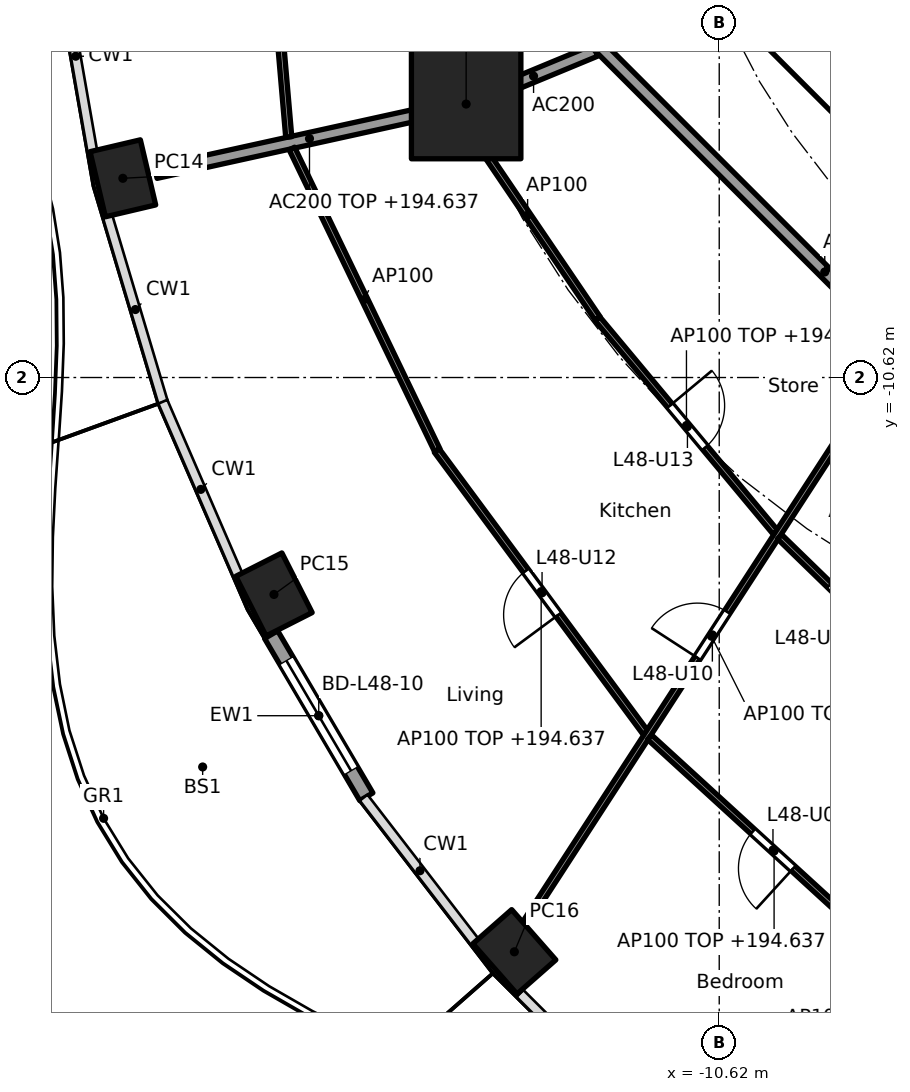
"""IFC4 building model, lengths in metres.
Left out: names, types, materials, properties, quantities, classifications, styles, units other than length and angle.
Written with IfcOpenShell. Run it as: python <this file> out.ifc"""

import sys

from ifc_helpers import new_model, si_unit, direction, frame, frame_2d, origin, origin_2d, place, context, subcontext, project, spatial, rectangle, hollow_rectangle, extrude, element, fill, save


model = new_model("IFC4")
c1 = context("Model", 3, precision=1e-05, world=origin(), true_north=direction((0.0, 1.0)))
c2 = subcontext(c1, "Body", "Model", "MODEL_VIEW")
j1 = project(units=[si_unit("LENGTHUNIT", "METRE"), si_unit("PLANEANGLEUNIT", "RADIAN")], contexts=[c1])
p1 = place(None, origin())
s1 = spatial("IfcSite", under=j1, at=p1, CompositionType="ELEMENT")
p2 = place(p1, origin())
s2 = spatial("IfcBuilding", under=s1, at=p2, CompositionType="ELEMENT")
p3 = place(p2, frame((0.0, 0.0, 191.8)))
s3 = spatial("IfcBuildingStorey", under=s2, at=p3, CompositionType="ELEMENT", Elevation=191.8)
for number, where, z_axis, x_axis in (
    (1, (-20.427, -7.344, 0.0), (0.0, 0.0, 1.0), (0.229, -0.973, 0.0)),
    (2, (-17.942, -14.188, 0.0), (0.0, 0.0, 1.0), (0.452, -0.892, 0.0)),
    (3, (-13.989, -20.064, 0.0), (0.0, 0.0, 1.0), (0.66, -0.751, 0.0)),
):
    element("IfcColumn", number, at=place(p3, frame(where, z_axis=z_axis, x_axis=x_axis)), inside=s3, PredefinedType="COLUMN", context=c2, shape_type="SweptSolid", body=[
        extrude(hollow_rectangle(XDim=1.1, YDim=0.85, WallThickness=0.036, at=origin_2d()), origin(), (0.0, 0.0, 1.0), 3.7),
    ])
p4 = place(p3, frame((-14.782, -6.123, 0.0), z_axis=(0.0, 0.0, 1.0), x_axis=(1.0, 0.0, 0.0)))
e4 = element("IfcColumn", 4, at=p4, inside=s3, PredefinedType="COLUMN", context=c2, shape_type="SweptSolid", body=[
    extrude(rectangle(XDim=1.8, YDim=1.8, at=origin_2d()), origin(), (0.0, 0.0, 1.0), 3.7),
])
p5 = place(p3, frame((-16.424, -17.515, 0.0), z_axis=(0.0, 0.0, 1.0), x_axis=(-0.506309086483, 0.862352079458, 0.0)))
e5 = element("IfcWall", 5, at=p5, inside=s3, PredefinedType="SOLIDWALL", context=c2, shape_type="SweptSolid", body=[
    extrude(rectangle(XDim=3.092, YDim=0.25, at=frame_2d((1.546, 0.0))), origin(), (0.0, 0.0, 1.0), 3.44),
])
p6 = place(p5, frame((0.496, 0.0, 0.0)))
e6 = element("IfcOpeningElement", 6, at=p6, cuts=e5, PredefinedType="OPENING", context=c2, shape_type="SweptSolid", body=[
    extrude(rectangle(XDim=2.1, YDim=2.4, at=frame_2d((1.05, 1.2))), frame((0.0, 0.135, 0.0), z_axis=(0.0, -1.0, 0.0), x_axis=(1.0, 0.0, 0.0)), (0.0, 0.0, 1.0), 0.27),
])
p7 = place(p3, frame((-9.988, -4.613, 0.0), z_axis=(0.0, 0.0, 1.0), x_axis=(0.707106781187, -0.707106781187, 0.0)))
e7 = element("IfcWall", 7, at=p7, inside=s3, PredefinedType="SHEAR", context=c2, shape_type="SweptSolid", body=[
    extrude(rectangle(XDim=7.602, YDim=0.6, at=frame_2d((3.801, 0.0))), origin(), (0.0, 0.0, 1.0), 3.44),
])
p8 = place(p7, frame((6.151, 0.0, 0.0)))
e8 = element("IfcOpeningElement", 8, at=p8, cuts=e7, PredefinedType="OPENING", context=c2, shape_type="SweptSolid", body=[
    extrude(rectangle(XDim=1.1, YDim=2.1, at=frame_2d((0.55, 1.05))), frame((0.0, 0.31, 0.0), z_axis=(0.0, -1.0, 0.0), x_axis=(1.0, 0.0, 0.0)), (0.0, 0.0, 1.0), 0.62),
])
p9 = place(p3, frame((-12.657, -5.243, 0.0), z_axis=(0.0, 0.0, 1.0), x_axis=(-0.923859888513, -0.38273085373, 0.0)))
e9 = element("IfcWall", 9, at=p9, inside=s3, PredefinedType="PARTITIONING", context=c2, shape_type="SweptSolid", body=[
    extrude(rectangle(XDim=2.199, YDim=0.2, at=frame_2d((1.1, 0.0))), origin(), (0.0, 0.0, 1.0), 3.44),
])
p10 = place(p3, frame((-14.831, -6.134, 0.0), z_axis=(0.0, 0.0, 1.0), x_axis=(-0.976568396888, -0.215207263354, 0.0)))
e10 = element("IfcWall", 10, at=p10, inside=s3, PredefinedType="PARTITIONING", context=c2, shape_type="SweptSolid", body=[
    extrude(rectangle(XDim=5.177, YDim=0.2, at=frame_2d((2.588, 0.0))), origin(), (0.0, 0.0, 1.0), 2.837),
])
p11 = place(p3, frame((-12.635, -5.134, 0.0), z_axis=(0.0, 0.0, 1.0), x_axis=(0.707106781187, -0.707106781187, 0.0)))
e11 = element("IfcWall", 11, at=p11, inside=s3, PredefinedType="PARTITIONING", context=c2, shape_type="SweptSolid", body=[
    extrude(rectangle(XDim=10.609, YDim=0.2, at=frame_2d((5.305, 0.0))), origin(), (0.0, 0.0, 1.0), 3.44),
])
p12 = place(p3, frame((-15.331, 0.05, 0.0), z_axis=(0.0, 0.0, 1.0), x_axis=(0.056310939406, -0.998413280212, 0.0)))
e12 = element("IfcWall", 12, at=p12, inside=s3, PredefinedType="PARTITIONING", context=c2, shape_type="SweptSolid", body=[
    extrude(rectangle(XDim=6.126, YDim=0.1, at=frame_2d((3.063, 0.0))), origin(), (0.0, 0.0, 1.0), 2.837),
])
p13 = place(p3, frame((-18.271, -0.05, 0.0), z_axis=(0.0, 0.0, 1.0), x_axis=(0.086012321907, -0.996294073294, 0.0)))
e13 = element("IfcWall", 13, at=p13, inside=s3, PredefinedType="PARTITIONING", context=c2, shape_type="SweptSolid", body=[
    extrude(rectangle(XDim=6.639, YDim=0.1, at=frame_2d((3.32, 0.0))), origin(), (0.0, 0.0, 1.0), 2.837),
])
p14 = place(p3, frame((-14.924, -6.249, 0.0), z_axis=(0.0, 0.0, 1.0), x_axis=(0.561046521684, -0.82778427172, 0.0)))
e14 = element("IfcWall", 14, at=p14, inside=s3, PredefinedType="PARTITIONING", context=c2, shape_type="SweptSolid", body=[
    extrude(rectangle(XDim=4.109, YDim=0.1, at=frame_2d((2.054, 0.0))), origin(), (0.0, 0.0, 1.0), 3.44),
])
p15 = place(p3, frame((-17.647, -6.854, 0.0), z_axis=(0.0, 0.0, 1.0), x_axis=(0.434027506504, -0.900899619046, 0.0)))
e15 = element("IfcWall", 15, at=p15, inside=s3, PredefinedType="PARTITIONING", context=c2, shape_type="SweptSolid", body=[
    extrude(rectangle(XDim=5.508, YDim=0.1, at=frame_2d((2.754, 0.0))), origin(), (0.0, 0.0, 1.0), 3.44),
])
p16 = place(p3, frame((-12.623, -9.653, 0.0), z_axis=(0.0, 0.0, 1.0), x_axis=(0.640315711982, -0.768111833647, 0.0)))
e16 = element("IfcWall", 16, at=p16, inside=s3, PredefinedType="PARTITIONING", context=c2, shape_type="SweptSolid", body=[
    extrude(rectangle(XDim=4.572, YDim=0.1, at=frame_2d((2.286, 0.0))), origin(), (0.0, 0.0, 1.0), 2.837),
])
p17 = place(p16, frame((1.861, 0.0, 0.0)))
e17 = element("IfcOpeningElement", 17, at=p17, cuts=e16, PredefinedType="OPENING", context=c2, shape_type="SweptSolid", body=[
    extrude(rectangle(XDim=0.9, YDim=2.1, at=frame_2d((0.45, 1.05))), frame((0.0, 0.06, 0.0), z_axis=(0.0, -1.0, 0.0), x_axis=(1.0, 0.0, 0.0)), (0.0, 0.0, 1.0), 0.12),
])
p18 = place(p3, frame((-15.265, -11.821, 0.0), z_axis=(0.0, 0.0, 1.0), x_axis=(0.594721645029, -0.803931691709, 0.0)))
e18 = element("IfcWall", 18, at=p18, inside=s3, PredefinedType="PARTITIONING", context=c2, shape_type="SweptSolid", body=[
    extrude(rectangle(XDim=5.772, YDim=0.1, at=frame_2d((2.886, 0.0))), origin(), (0.0, 0.0, 1.0), 2.837),
])
p19 = place(p18, frame((2.461, 0.0, 0.0)))
e19 = element("IfcOpeningElement", 19, at=p19, cuts=e18, PredefinedType="OPENING", context=c2, shape_type="SweptSolid", body=[
    extrude(rectangle(XDim=0.9, YDim=2.1, at=frame_2d((0.45, 1.05))), frame((0.0, 0.06, 0.0), z_axis=(0.0, -1.0, 0.0), x_axis=(1.0, 0.0, 0.0)), (0.0, 0.0, 1.0), 0.12),
])
p20 = place(p3, frame((-7.712, -10.195, 0.0), z_axis=(0.0, 0.0, 1.0), x_axis=(-0.544176533609, -0.838970738625, 0.0)))
e20 = element("IfcWall", 20, at=p20, inside=s3, PredefinedType="PARTITIONING", context=c2, shape_type="SweptSolid", body=[
    extrude(rectangle(XDim=11.156, YDim=0.1, at=frame_2d((5.578, 0.0))), origin(), (0.0, 0.0, 1.0), 2.756),
])
p21 = place(p20, frame((5.101, 0.0, 0.0)))
e21 = element("IfcOpeningElement", 21, at=p21, cuts=e20, PredefinedType="OPENING", context=c2, shape_type="SweptSolid", body=[
    extrude(rectangle(XDim=0.9, YDim=2.1, at=frame_2d((0.45, 1.05))), frame((0.0, 0.06, 0.0), z_axis=(0.0, -1.0, 0.0), x_axis=(1.0, 0.0, 0.0)), (0.0, 0.0, 1.0), 0.12),
])
p22 = place(p3, frame((-9.627, -13.238, 0.0), z_axis=(0.0, 0.0, 1.0), x_axis=(0.716946269374, -0.697128429223, 0.0)))
e22 = element("IfcWall", 22, at=p22, inside=s3, PredefinedType="PARTITIONING", context=c2, shape_type="SweptSolid", body=[
    extrude(rectangle(XDim=4.25, YDim=0.1, at=frame_2d((2.125, 0.0))), origin(), (0.0, 0.0, 1.0), 2.837),
])
p23 = place(p22, frame((1.145, 0.0, 0.0)))
e23 = element("IfcOpeningElement", 23, at=p23, cuts=e22, PredefinedType="OPENING", context=c2, shape_type="SweptSolid", body=[
    extrude(rectangle(XDim=0.9, YDim=2.1, at=frame_2d((0.45, 1.05))), frame((0.0, 0.06, 0.0), z_axis=(0.0, -1.0, 0.0), x_axis=(1.0, 0.0, 0.0)), (0.0, 0.0, 1.0), 0.12),
])
p24 = place(p3, frame((-11.766, -16.535, 0.0), z_axis=(0.0, 0.0, 1.0), x_axis=(0.738053852169, -0.674741810842, 0.0)))
e24 = element("IfcWall", 24, at=p24, inside=s3, PredefinedType="PARTITIONING", context=c2, shape_type="SweptSolid", body=[
    extrude(rectangle(XDim=5.549, YDim=0.1, at=frame_2d((2.774, 0.0))), origin(), (0.0, 0.0, 1.0), 2.837),
])
p25 = place(p24, frame((2.3, 0.0, 0.0)))
e25 = element("IfcOpeningElement", 25, at=p25, cuts=e24, PredefinedType="OPENING", context=c2, shape_type="SweptSolid", body=[
    extrude(rectangle(XDim=0.9, YDim=2.1, at=frame_2d((0.45, 1.05))), frame((0.0, 0.06, 0.0), z_axis=(0.0, -1.0, 0.0), x_axis=(1.0, 0.0, 0.0)), (0.0, 0.0, 1.0), 0.12),
])
p26 = place(p3, frame((-7.721, -20.293, 0.0), z_axis=(0.0, 0.0, 1.0), x_axis=(-0.278445616281, -0.960451997121, 0.0)))
e26 = element("IfcWall", 26, at=p26, inside=s3, PredefinedType="PARTITIONING", context=c2, shape_type="SweptSolid", body=[
    extrude(rectangle(XDim=3.885, YDim=0.1, at=frame_2d((1.942, 0.0))), origin(), (0.0, 0.0, 1.0), 2.837),
])
p27 = place(p6, origin())
e27 = element("IfcDoor", 27, at=p27, inside=s3, OperationType="SLIDING_TO_LEFT", PredefinedType="DOOR", context=c2, shape_type="SweptSolid", body=[
    extrude(rectangle(XDim=2.1, YDim=2.4, at=frame_2d((1.05, 1.2))), frame((0.0, 0.025, 0.0), z_axis=(0.0, -1.0, 0.0), x_axis=(1.0, 0.0, 0.0)), (0.0, 0.0, 1.0), 0.05),
])
fill(e6, e27)
p28 = place(p25, frame((0.9, 0.0, 0.0), x_axis=(-1.0, 0.0, 0.0)))
e28 = element("IfcDoor", 28, at=p28, inside=s3, OperationType="SINGLE_SWING_LEFT", PredefinedType="DOOR", context=c2, shape_type="SweptSolid", body=[
    extrude(rectangle(XDim=0.9, YDim=2.1, at=frame_2d((0.45, 1.05))), frame((0.0, 0.025, 0.0), z_axis=(0.0, -1.0, 0.0), x_axis=(1.0, 0.0, 0.0)), (0.0, 0.0, 1.0), 0.05),
])
fill(e25, e28)
p29 = place(p23, origin())
e29 = element("IfcDoor", 29, at=p29, inside=s3, OperationType="SINGLE_SWING_LEFT", PredefinedType="DOOR", context=c2, shape_type="SweptSolid", body=[
    extrude(rectangle(XDim=0.9, YDim=2.1, at=frame_2d((0.45, 1.05))), frame((0.0, 0.025, 0.0), z_axis=(0.0, -1.0, 0.0), x_axis=(1.0, 0.0, 0.0)), (0.0, 0.0, 1.0), 0.05),
])
fill(e23, e29)
p30 = place(p21, frame((0.9, 0.0, 0.0), x_axis=(-1.0, 0.0, 0.0)))
e30 = element("IfcDoor", 30, at=p30, inside=s3, OperationType="SINGLE_SWING_LEFT", PredefinedType="DOOR", context=c2, shape_type="SweptSolid", body=[
    extrude(rectangle(XDim=0.9, YDim=2.1, at=frame_2d((0.45, 1.05))), frame((0.0, 0.025, 0.0), z_axis=(0.0, -1.0, 0.0), x_axis=(1.0, 0.0, 0.0)), (0.0, 0.0, 1.0), 0.05),
])
fill(e21, e30)
p31 = place(p19, frame((0.9, 0.0, 0.0), x_axis=(-1.0, 0.0, 0.0)))
e31 = element("IfcDoor", 31, at=p31, inside=s3, OperationType="SINGLE_SWING_LEFT", PredefinedType="DOOR", context=c2, shape_type="SweptSolid", body=[
    extrude(rectangle(XDim=0.9, YDim=2.1, at=frame_2d((0.45, 1.05))), frame((0.0, 0.025, 0.0), z_axis=(0.0, -1.0, 0.0), x_axis=(1.0, 0.0, 0.0)), (0.0, 0.0, 1.0), 0.05),
])
fill(e19, e31)
p32 = place(p17, origin())
e32 = element("IfcDoor", 32, at=p32, inside=s3, OperationType="SINGLE_SWING_LEFT", PredefinedType="DOOR", context=c2, shape_type="SweptSolid", body=[
    extrude(rectangle(XDim=0.9, YDim=2.1, at=frame_2d((0.45, 1.05))), frame((0.0, 0.025, 0.0), z_axis=(0.0, -1.0, 0.0), x_axis=(1.0, 0.0, 0.0)), (0.0, 0.0, 1.0), 0.05),
])
fill(e17, e32)
save(model, sys.argv[1])
